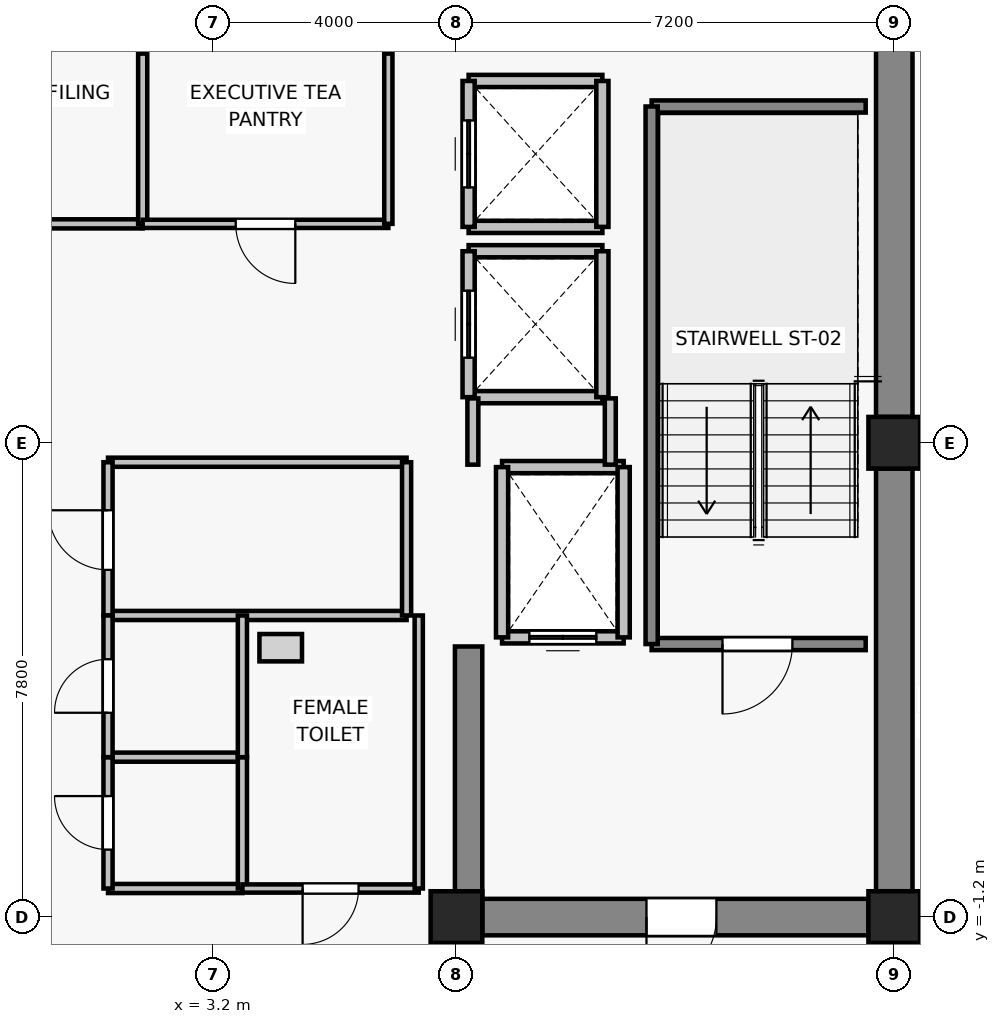
"""IFC4 building model, lengths in metres.
Left out: names, types, materials, properties, quantities, classifications, styles, units other than length and angle.
Written with IfcOpenShell. Run it as: python <this file> out.ifc"""

import sys

from ifc_helpers import new_model, si_unit, direction, frame, frame_2d, origin, origin_2d, place, context, subcontext, project, spatial, rectangle, extrude, source, transform, mapped, element, fill, save


model = new_model("IFC4")
c1 = context("Model", 3, precision=1e-05, world=origin(), true_north=direction((0.0, 1.0)))
c2 = subcontext(c1, "Body", "Model", "MODEL_VIEW")
j1 = project(units=[si_unit("LENGTHUNIT", "METRE"), si_unit("PLANEANGLEUNIT", "RADIAN")], contexts=[c1])
p1 = place(None, origin())
s1 = spatial("IfcSite", under=j1, at=p1, CompositionType="ELEMENT")
p2 = place(p1, origin())
s2 = spatial("IfcBuilding", under=s1, at=p2, CompositionType="ELEMENT")
p3 = place(p2, frame((0.0, 0.0, 245.2)))
s3 = spatial("IfcBuildingStorey", under=s2, at=p3, CompositionType="ELEMENT", Elevation=245.2)
for number, where, z_axis, x_axis in (
    (1, (7.2, -1.2, 0.0), (0.0, 0.0, 1.0), (1.0, 0.0, 0.0)),
    (2, (14.4, -1.2, 0.0), (0.0, 0.0, 1.0), (1.0, 0.0, 0.0)),
    (3, (14.4, 6.6, 0.0), (0.0, 0.0, 1.0), (1.0, 0.0, 0.0)),
):
    element("IfcColumn", number, at=place(p3, frame(where, z_axis=z_axis, x_axis=x_axis)), inside=s3, PredefinedType="COLUMN", context=c2, shape_type="SweptSolid", body=[
        extrude(rectangle(XDim=0.85, YDim=0.85, at=origin_2d()), origin(), (0.0, 0.0, 1.0), 3.3),
    ])
p4 = place(p3, frame((14.4, -0.775, 0.0), z_axis=(0.0, 0.0, 1.0), x_axis=(0.0, 1.0, 0.0)))
e4 = element("IfcWall", 4, at=p4, inside=s3, PredefinedType="SHEAR", context=c2, shape_type="SweptSolid", body=[
    extrude(rectangle(XDim=6.95, YDim=0.6, at=frame_2d((3.475, 0.0))), origin(), (0.0, 0.0, 1.0), 3.075),
])
p5 = place(p3, frame((14.4, 7.025, 0.0), z_axis=(0.0, 0.0, 1.0), x_axis=(0.0, 1.0, 0.0)))
e5 = element("IfcWall", 5, at=p5, inside=s3, PredefinedType="SHEAR", context=c2, shape_type="SweptSolid", body=[
    extrude(rectangle(XDim=6.05, YDim=0.6, at=frame_2d((3.025, 0.0))), origin(), (0.0, 0.0, 1.0), 3.075),
])
p6 = place(p3, frame((13.975, -1.2, 0.0), z_axis=(0.0, 0.0, 1.0), x_axis=(-1.0, 0.0, 0.0)))
e6 = element("IfcWall", 6, at=p6, inside=s3, PredefinedType="SHEAR", context=c2, shape_type="SweptSolid", body=[
    extrude(rectangle(XDim=6.35, YDim=0.6, at=frame_2d((3.175, 0.0))), origin(), (0.0, 0.0, 1.0), 3.075),
])
p7 = place(p6, frame((2.5, 0.0, 0.0)))
e7 = element("IfcOpeningElement", 7, at=p7, cuts=e6, PredefinedType="OPENING", context=c2, shape_type="SweptSolid", body=[
    extrude(rectangle(XDim=1.15, YDim=2.15, at=frame_2d((0.575, 1.075))), frame((0.0, 0.31, 0.0), z_axis=(0.0, -1.0, 0.0), x_axis=(1.0, 0.0, 0.0)), (0.0, 0.0, 1.0), 0.62),
])
p8 = place(p3, frame((7.4, -0.9, 0.0), z_axis=(0.0, 0.0, 1.0), x_axis=(0.0, 1.0, 0.0)))
e8 = element("IfcWall", 8, at=p8, inside=s3, PredefinedType="SHEAR", context=c2, shape_type="SweptSolid", body=[
    extrude(rectangle(XDim=4.15, YDim=0.45, at=frame_2d((2.075, 0.0))), origin(), (0.0, 0.0, 1.0), 3.075),
])
p9 = place(p3, frame((9.95, 3.4, 0.0), z_axis=(0.0, 0.0, 1.0), x_axis=(-1.0, 0.0, 0.0)))
e9 = element("IfcWall", 9, at=p9, inside=s3, PredefinedType="SOLIDWALL", context=c2, shape_type="SweptSolid", body=[
    extrude(rectangle(XDim=2.0, YDim=0.2, at=frame_2d((1.0, 0.0))), origin(), (0.0, 0.0, 1.0), 3.075),
])
p10 = place(p9, frame((0.45, 0.0, 0.0)))
e10 = element("IfcOpeningElement", 10, at=p10, cuts=e9, PredefinedType="OPENING", context=c2, shape_type="SweptSolid", body=[
    extrude(rectangle(XDim=1.1, YDim=2.2, at=frame_2d((0.55, 1.1))), frame((0.0, 0.11, 0.0), z_axis=(0.0, -1.0, 0.0), x_axis=(1.0, 0.0, 0.0)), (0.0, 0.0, 1.0), 0.22),
])
p11 = place(p3, frame((7.95, 6.2, 0.0), z_axis=(0.0, 0.0, 1.0), x_axis=(1.0, 0.0, 0.0)))
e11 = element("IfcWall", 11, at=p11, inside=s3, PredefinedType="SOLIDWALL", context=c2, shape_type="SweptSolid", body=[
    extrude(rectangle(XDim=2.0, YDim=0.2, at=frame_2d((1.0, 0.0))), origin(), (0.0, 0.0, 1.0), 3.075),
])
for number, where, z_axis, x_axis in (
    (12, (7.95, 3.4, 0.0), (0.0, 0.0, 1.0), (0.0, 1.0, 0.0)),
    (13, (9.95, 6.2, 0.0), (0.0, 0.0, 1.0), (0.0, -1.0, 0.0)),
):
    element("IfcWall", number, at=place(p3, frame(where, z_axis=z_axis, x_axis=x_axis)), inside=s3, PredefinedType="SOLIDWALL", context=c2, shape_type="SweptSolid", body=[
        extrude(rectangle(XDim=2.8, YDim=0.2, at=frame_2d((1.4, 0.0))), origin(), (0.0, 0.0, 1.0), 3.075),
    ])
for number, where, z_axis, x_axis in (
    (14, (9.6, 7.35, 0.0), (0.0, 0.0, 1.0), (-1.0, 0.0, 0.0)),
    (15, (7.4, 9.75, 0.0), (0.0, 0.0, 1.0), (1.0, 0.0, 0.0)),
):
    element("IfcWall", number, at=place(p3, frame(where, z_axis=z_axis, x_axis=x_axis)), inside=s3, PredefinedType="SOLIDWALL", context=c2, shape_type="SweptSolid", body=[
        extrude(rectangle(XDim=2.2, YDim=0.2, at=frame_2d((1.1, 0.0))), origin(), (0.0, 0.0, 1.0), 2.615),
    ])
p12 = place(p3, frame((7.4, 7.35, 0.0), z_axis=(0.0, 0.0, 1.0), x_axis=(0.0, 1.0, 0.0)))
e16 = element("IfcWall", 16, at=p12, inside=s3, PredefinedType="SOLIDWALL", context=c2, shape_type="SweptSolid", body=[
    extrude(rectangle(XDim=2.4, YDim=0.2, at=frame_2d((1.2, 0.0))), origin(), (0.0, 0.0, 1.0), 2.615),
])
p13 = place(p12, frame((0.65, 0.0, 0.0)))
e17 = element("IfcOpeningElement", 17, at=p13, cuts=e16, PredefinedType="OPENING", context=c2, shape_type="SweptSolid", body=[
    extrude(rectangle(XDim=1.1, YDim=2.2, at=frame_2d((0.55, 1.1))), frame((0.0, 0.11, 0.0), z_axis=(0.0, -1.0, 0.0), x_axis=(1.0, 0.0, 0.0)), (0.0, 0.0, 1.0), 0.22),
])
p14 = place(p3, frame((9.6, 9.75, 0.0), z_axis=(0.0, 0.0, 1.0), x_axis=(0.0, -1.0, 0.0)))
e18 = element("IfcWall", 18, at=p14, inside=s3, PredefinedType="SOLIDWALL", context=c2, shape_type="SweptSolid", body=[
    extrude(rectangle(XDim=2.4, YDim=0.2, at=frame_2d((1.2, 0.0))), origin(), (0.0, 0.0, 1.0), 3.075),
])
for number, where, z_axis, x_axis in (
    (19, (9.6, 10.15, 0.0), (0.0, 0.0, 1.0), (-1.0, 0.0, 0.0)),
    (20, (7.4, 12.55, 0.0), (0.0, 0.0, 1.0), (1.0, 0.0, 0.0)),
):
    element("IfcWall", number, at=place(p3, frame(where, z_axis=z_axis, x_axis=x_axis)), inside=s3, PredefinedType="SOLIDWALL", context=c2, shape_type="SweptSolid", body=[
        extrude(rectangle(XDim=2.2, YDim=0.2, at=frame_2d((1.1, 0.0))), origin(), (0.0, 0.0, 1.0), 2.615),
    ])
p15 = place(p3, frame((7.4, 10.15, 0.0), z_axis=(0.0, 0.0, 1.0), x_axis=(0.0, 1.0, 0.0)))
e21 = element("IfcWall", 21, at=p15, inside=s3, PredefinedType="SOLIDWALL", context=c2, shape_type="SweptSolid", body=[
    extrude(rectangle(XDim=2.4, YDim=0.2, at=frame_2d((1.2, 0.0))), origin(), (0.0, 0.0, 1.0), 2.615),
])
p16 = place(p15, frame((0.65, 0.0, 0.0)))
e22 = element("IfcOpeningElement", 22, at=p16, cuts=e21, PredefinedType="OPENING", context=c2, shape_type="SweptSolid", body=[
    extrude(rectangle(XDim=1.1, YDim=2.2, at=frame_2d((0.55, 1.1))), frame((0.0, 0.11, 0.0), z_axis=(0.0, -1.0, 0.0), x_axis=(1.0, 0.0, 0.0)), (0.0, 0.0, 1.0), 0.22),
])
p17 = place(p3, frame((9.6, 12.55, 0.0), z_axis=(0.0, 0.0, 1.0), x_axis=(0.0, -1.0, 0.0)))
e23 = element("IfcWall", 23, at=p17, inside=s3, PredefinedType="SOLIDWALL", context=c2, shape_type="SweptSolid", body=[
    extrude(rectangle(XDim=2.4, YDim=0.2, at=frame_2d((1.2, 0.0))), origin(), (0.0, 0.0, 1.0), 3.075),
])
p18 = place(p3, frame((13.93, 3.29, 0.0), z_axis=(0.0, 0.0, 1.0), x_axis=(-1.0, 0.0, 0.0)))
e24 = element("IfcWall", 24, at=p18, inside=s3, PredefinedType="SOLIDWALL", context=c2, shape_type="SweptSolid", body=[
    extrude(rectangle(XDim=3.52, YDim=0.2, at=frame_2d((1.76, 0.0))), origin(), (0.0, 0.0, 1.0), 3.075),
])
p19 = place(p18, frame((1.205, 0.0, 0.0)))
e25 = element("IfcOpeningElement", 25, at=p19, cuts=e24, PredefinedType="OPENING", context=c2, shape_type="SweptSolid", body=[
    extrude(rectangle(XDim=1.15, YDim=2.15, at=frame_2d((0.575, 1.075))), frame((0.0, 0.11, 0.0), z_axis=(0.0, -1.0, 0.0), x_axis=(1.0, 0.0, 0.0)), (0.0, 0.0, 1.0), 0.22),
])
p20 = place(p3, frame((10.41, 12.13, 0.0), z_axis=(0.0, 0.0, 1.0), x_axis=(1.0, 0.0, 0.0)))
e26 = element("IfcWall", 26, at=p20, inside=s3, PredefinedType="SOLIDWALL", context=c2, shape_type="SweptSolid", body=[
    extrude(rectangle(XDim=3.52, YDim=0.2, at=frame_2d((1.76, 0.0))), origin(), (0.0, 0.0, 1.0), 3.075),
])
p21 = place(p3, frame((10.41, 3.29, 0.0), z_axis=(0.0, 0.0, 1.0), x_axis=(0.0, 1.0, 0.0)))
e27 = element("IfcWall", 27, at=p21, inside=s3, PredefinedType="SOLIDWALL", context=c2, shape_type="SweptSolid", body=[
    extrude(rectangle(XDim=8.84, YDim=0.2, at=frame_2d((4.42, 0.0))), origin(), (0.0, 0.0, 1.0), 3.075),
])
p22 = place(p3, frame((7.47, 6.24, 0.0), z_axis=(0.0, 0.0, 1.0), x_axis=(0.0, 1.0, 0.0)))
e28 = element("IfcWall", 28, at=p22, inside=s3, PredefinedType="PARTITIONING", context=c2, shape_type="SweptSolid", body=[
    extrude(rectangle(XDim=1.09, YDim=0.18, at=frame_2d((0.545, 0.0))), origin(), (0.0, 0.0, 1.0), 2.615),
])
p23 = place(p3, frame((9.73, 7.33, 0.0), z_axis=(0.0, 0.0, 1.0), x_axis=(0.0, -1.0, 0.0)))
e29 = element("IfcWall", 29, at=p23, inside=s3, PredefinedType="PARTITIONING", context=c2, shape_type="SweptSolid", body=[
    extrude(rectangle(XDim=1.09, YDim=0.18, at=frame_2d((0.545, 0.0))), origin(), (0.0, 0.0, 1.0), 3.075),
])
p24 = place(p3, frame((2.04, 10.2, 0.0), z_axis=(0.0, 0.0, 1.0), x_axis=(-1.0, 0.0, 0.0)))
e30 = element("IfcWall", 30, at=p24, inside=s3, PredefinedType="PARTITIONING", context=c2, shape_type="SweptSolid", body=[
    extrude(rectangle(XDim=4.16, YDim=0.15, at=frame_2d((2.08, 0.0))), origin(), (0.0, 0.0, 1.0), 3.075),
])
p25 = place(p24, frame((1.55, 0.0, 0.0)))
e31 = element("IfcOpeningElement", 31, at=p25, cuts=e30, PredefinedType="OPENING", context=c2, shape_type="SweptSolid", body=[
    extrude(rectangle(XDim=0.98, YDim=2.15, at=frame_2d((0.49, 1.075))), frame((0.0, 0.085, 0.0), z_axis=(0.0, -1.0, 0.0), x_axis=(1.0, 0.0, 0.0)), (0.0, 0.0, 1.0), 0.17),
])
p26 = place(p3, frame((2.04, 13.0, 0.0), z_axis=(0.0, 0.0, 1.0), x_axis=(0.0, -1.0, 0.0)))
e32 = element("IfcWall", 32, at=p26, inside=s3, PredefinedType="PARTITIONING", context=c2, shape_type="SweptSolid", body=[
    extrude(rectangle(XDim=2.8, YDim=0.15, at=frame_2d((1.4, 0.0))), origin(), (0.0, 0.0, 1.0), 3.075),
])
p27 = place(p3, frame((6.08, 10.2, 0.0), z_axis=(0.0, 0.0, 1.0), x_axis=(-1.0, 0.0, 0.0)))
e33 = element("IfcWall", 33, at=p27, inside=s3, PredefinedType="PARTITIONING", context=c2, shape_type="SweptSolid", body=[
    extrude(rectangle(XDim=4.04, YDim=0.135, at=frame_2d((2.02, 0.0))), origin(), (0.0, 0.0, 1.0), 3.075),
])
p28 = place(p27, frame((1.53, 0.0, 0.0)))
e34 = element("IfcOpeningElement", 34, at=p28, cuts=e33, PredefinedType="OPENING", context=c2, shape_type="SweptSolid", body=[
    extrude(rectangle(XDim=0.98, YDim=2.15, at=frame_2d((0.49, 1.075))), frame((0.0, 0.077, 0.0), z_axis=(0.0, -1.0, 0.0), x_axis=(1.0, 0.0, 0.0)), (0.0, 0.0, 1.0), 0.155),
])
p29 = place(p3, frame((6.08, 13.0, 0.0), z_axis=(0.0, 0.0, 1.0), x_axis=(0.0, -1.0, 0.0)))
e35 = element("IfcWall", 35, at=p29, inside=s3, PredefinedType="PARTITIONING", context=c2, shape_type="SweptSolid", body=[
    extrude(rectangle(XDim=2.8, YDim=0.135, at=frame_2d((1.4, 0.0))), origin(), (0.0, 0.0, 1.0), 3.075),
])
for number, where, z_axis, x_axis in (
    (36, (6.38, 3.76, 0.0), (0.0, 0.0, 1.0), (-1.0, 0.0, 0.0)),
    (37, (1.47, 6.28, 0.0), (0.0, 0.0, 1.0), (1.0, 0.0, 0.0)),
):
    element("IfcWall", number, at=place(p3, frame(where, z_axis=z_axis, x_axis=x_axis)), inside=s3, PredefinedType="PARTITIONING", context=c2, shape_type="SweptSolid", body=[
        extrude(rectangle(XDim=4.91, YDim=0.15, at=frame_2d((2.455, 0.0))), origin(), (0.0, 0.0, 1.0), 3.075),
    ])
p30 = place(p3, frame((1.47, 3.76, 0.0), z_axis=(0.0, 0.0, 1.0), x_axis=(0.0, 1.0, 0.0)))
e38 = element("IfcWall", 38, at=p30, inside=s3, PredefinedType="PARTITIONING", context=c2, shape_type="SweptSolid", body=[
    extrude(rectangle(XDim=2.52, YDim=0.15, at=frame_2d((1.26, 0.0))), origin(), (0.0, 0.0, 1.0), 3.075),
])
p31 = place(p30, frame((0.75, 0.0, 0.0)))
e39 = element("IfcOpeningElement", 39, at=p31, cuts=e38, PredefinedType="OPENING", context=c2, shape_type="SweptSolid", body=[
    extrude(rectangle(XDim=0.98, YDim=2.15, at=frame_2d((0.49, 1.075))), frame((0.0, 0.085, 0.0), z_axis=(0.0, -1.0, 0.0), x_axis=(1.0, 0.0, 0.0)), (0.0, 0.0, 1.0), 0.17),
])
p32 = place(p3, frame((6.38, 6.28, 0.0), z_axis=(0.0, 0.0, 1.0), x_axis=(0.0, -1.0, 0.0)))
e40 = element("IfcWall", 40, at=p32, inside=s3, PredefinedType="PARTITIONING", context=c2, shape_type="SweptSolid", body=[
    extrude(rectangle(XDim=2.52, YDim=0.15, at=frame_2d((1.26, 0.0))), origin(), (0.0, 0.0, 1.0), 3.075),
])
for number, where, z_axis, x_axis in (
    (41, (3.68, -0.73, 0.0), (0.0, 0.0, 1.0), (-1.0, 0.0, 0.0)),
    (42, (1.47, 1.43, 0.0), (0.0, 0.0, 1.0), (1.0, 0.0, 0.0)),
):
    element("IfcWall", number, at=place(p3, frame(where, z_axis=z_axis, x_axis=x_axis)), inside=s3, PredefinedType="PARTITIONING", context=c2, shape_type="SweptSolid", body=[
        extrude(rectangle(XDim=2.21, YDim=0.15, at=frame_2d((1.105, 0.0))), origin(), (0.0, 0.0, 1.0), 3.075),
    ])
p33 = place(p3, frame((1.47, -0.73, 0.0), z_axis=(0.0, 0.0, 1.0), x_axis=(0.0, 1.0, 0.0)))
e43 = element("IfcWall", 43, at=p33, inside=s3, PredefinedType="PARTITIONING", context=c2, shape_type="SweptSolid", body=[
    extrude(rectangle(XDim=2.16, YDim=0.15, at=frame_2d((1.08, 0.0))), origin(), (0.0, 0.0, 1.0), 3.075),
])
p34 = place(p33, frame((0.64, 0.0, 0.0)))
e44 = element("IfcOpeningElement", 44, at=p34, cuts=e43, PredefinedType="OPENING", context=c2, shape_type="SweptSolid", body=[
    extrude(rectangle(XDim=0.88, YDim=2.1, at=frame_2d((0.44, 1.05))), frame((0.0, 0.085, 0.0), z_axis=(0.0, -1.0, 0.0), x_axis=(1.0, 0.0, 0.0)), (0.0, 0.0, 1.0), 0.17),
])
p35 = place(p3, frame((3.68, 1.43, 0.0), z_axis=(0.0, 0.0, 1.0), x_axis=(0.0, -1.0, 0.0)))
e45 = element("IfcWall", 45, at=p35, inside=s3, PredefinedType="PARTITIONING", context=c2, shape_type="SweptSolid", body=[
    extrude(rectangle(XDim=2.16, YDim=0.15, at=frame_2d((1.08, 0.0))), origin(), (0.0, 0.0, 1.0), 3.075),
])
p36 = place(p3, frame((1.47, 1.43, 0.0), z_axis=(0.0, 0.0, 1.0), x_axis=(0.0, 1.0, 0.0)))
e46 = element("IfcWall", 46, at=p36, inside=s3, PredefinedType="PARTITIONING", context=c2, shape_type="SweptSolid", body=[
    extrude(rectangle(XDim=2.33, YDim=0.15, at=frame_2d((1.165, 0.0))), origin(), (0.0, 0.0, 1.0), 3.075),
])
p37 = place(p36, frame((0.73, 0.0, 0.0)))
e47 = element("IfcOpeningElement", 47, at=p37, cuts=e46, PredefinedType="OPENING", context=c2, shape_type="SweptSolid", body=[
    extrude(rectangle(XDim=0.88, YDim=2.15, at=frame_2d((0.44, 1.075))), frame((0.0, 0.085, 0.0), z_axis=(0.0, -1.0, 0.0), x_axis=(1.0, 0.0, 0.0)), (0.0, 0.0, 1.0), 0.17),
])
p38 = place(p3, frame((3.68, 3.76, 0.0), z_axis=(0.0, 0.0, 1.0), x_axis=(0.0, -1.0, 0.0)))
e48 = element("IfcWall", 48, at=p38, inside=s3, PredefinedType="PARTITIONING", context=c2, shape_type="SweptSolid", body=[
    extrude(rectangle(XDim=2.33, YDim=0.15, at=frame_2d((1.165, 0.0))), origin(), (0.0, 0.0, 1.0), 3.075),
])
p39 = place(p3, frame((6.58, -0.73, 0.0), z_axis=(0.0, 0.0, 1.0), x_axis=(-1.0, 0.0, 0.0)))
e49 = element("IfcWall", 49, at=p39, inside=s3, PredefinedType="PARTITIONING", context=c2, shape_type="SweptSolid", body=[
    extrude(rectangle(XDim=2.9, YDim=0.135, at=frame_2d((1.45, 0.0))), origin(), (0.0, 0.0, 1.0), 3.075),
])
p40 = place(p39, frame((0.99, 0.0, 0.0)))
e50 = element("IfcOpeningElement", 50, at=p40, cuts=e49, PredefinedType="OPENING", context=c2, shape_type="SweptSolid", body=[
    extrude(rectangle(XDim=0.92, YDim=2.1, at=frame_2d((0.46, 1.05))), frame((0.0, 0.077, 0.0), z_axis=(0.0, -1.0, 0.0), x_axis=(1.0, 0.0, 0.0)), (0.0, 0.0, 1.0), 0.155),
])
p41 = place(p3, frame((6.58, 3.76, 0.0), z_axis=(0.0, 0.0, 1.0), x_axis=(0.0, -1.0, 0.0)))
e51 = element("IfcWall", 51, at=p41, inside=s3, PredefinedType="PARTITIONING", context=c2, shape_type="SweptSolid", body=[
    extrude(rectangle(XDim=4.49, YDim=0.135, at=frame_2d((2.245, 0.0))), origin(), (0.0, 0.0, 1.0), 3.075),
])
m1 = source(origin(), c2, "Body", "SweptSolid", [
    extrude(rectangle(XDim=1.1, YDim=2.2, at=frame_2d((0.55, 1.1))), frame((0.0, 0.025, 0.0), z_axis=(0.0, -1.0, 0.0), x_axis=(1.0, 0.0, 0.0)), (0.0, 0.0, 1.0), 0.05),
])
p42 = place(p10, origin())
e52 = element("IfcDoor", 52, at=p42, inside=s3, OperationType="DOUBLE_DOOR_SLIDING", PredefinedType="DOOR", context=c2, shape_type="MappedRepresentation", body=[
    mapped(m1, transform((0.0, 0.0, 0.0), x_axis=(1.0, 0.0, 0.0), y_axis=(0.0, 1.0, 0.0), z_axis=(0.0, 0.0, 1.0), scale=1.0)),
])
fill(e10, e52)
p43 = place(p13, origin())
e53 = element("IfcDoor", 53, at=p43, inside=s3, OperationType="DOUBLE_DOOR_SLIDING", PredefinedType="DOOR", context=c2, shape_type="MappedRepresentation", body=[
    mapped(m1, transform((0.0, 0.0, 0.0), x_axis=(1.0, 0.0, 0.0), y_axis=(0.0, 1.0, 0.0), z_axis=(0.0, 0.0, 1.0), scale=1.0)),
])
fill(e17, e53)
p44 = place(p16, origin())
e54 = element("IfcDoor", 54, at=p44, inside=s3, OperationType="DOUBLE_DOOR_SLIDING", PredefinedType="DOOR", context=c2, shape_type="MappedRepresentation", body=[
    mapped(m1, transform((0.0, 0.0, 0.0), x_axis=(1.0, 0.0, 0.0), y_axis=(0.0, 1.0, 0.0), z_axis=(0.0, 0.0, 1.0), scale=1.0)),
])
fill(e22, e54)
m2 = source(origin(), c2, "Body", "SweptSolid", [
    extrude(rectangle(XDim=1.15, YDim=2.15, at=frame_2d((0.575, 1.075))), frame((0.0, 0.025, 0.0), z_axis=(0.0, -1.0, 0.0), x_axis=(1.0, 0.0, 0.0)), (0.0, 0.0, 1.0), 0.05),
])
p45 = place(p19, origin())
e55 = element("IfcDoor", 55, at=p45, inside=s3, OperationType="SINGLE_SWING_RIGHT", PredefinedType="DOOR", context=c2, shape_type="MappedRepresentation", body=[
    mapped(m2, transform((0.0, 0.0, 0.0), x_axis=(1.0, 0.0, 0.0), y_axis=(0.0, 1.0, 0.0), z_axis=(0.0, 0.0, 1.0), scale=1.0)),
])
fill(e25, e55)
p46 = place(p7, origin())
e56 = element("IfcDoor", 56, at=p46, inside=s3, OperationType="SINGLE_SWING_RIGHT", PredefinedType="DOOR", context=c2, shape_type="MappedRepresentation", body=[
    mapped(m2, transform((0.0, 0.0, 0.0), x_axis=(1.0, 0.0, 0.0), y_axis=(0.0, 1.0, 0.0), z_axis=(0.0, 0.0, 1.0), scale=1.0)),
])
fill(e7, e56)
m3 = source(origin(), c2, "Body", "SweptSolid", [
    extrude(rectangle(XDim=0.98, YDim=2.15, at=frame_2d((0.49, 1.075))), frame((0.0, 0.025, 0.0), z_axis=(0.0, -1.0, 0.0), x_axis=(1.0, 0.0, 0.0)), (0.0, 0.0, 1.0), 0.05),
])
p47 = place(p28, origin())
e57 = element("IfcDoor", 57, at=p47, inside=s3, OperationType="SINGLE_SWING_LEFT", PredefinedType="DOOR", context=c2, shape_type="MappedRepresentation", body=[
    mapped(m3, transform((0.0, 0.0, 0.0), x_axis=(1.0, 0.0, 0.0), y_axis=(0.0, 1.0, 0.0), z_axis=(0.0, 0.0, 1.0), scale=1.0)),
])
fill(e34, e57)
p48 = place(p31, origin())
e58 = element("IfcDoor", 58, at=p48, inside=s3, OperationType="SINGLE_SWING_RIGHT", PredefinedType="DOOR", context=c2, shape_type="MappedRepresentation", body=[
    mapped(m3, transform((0.0, 0.0, 0.0), x_axis=(1.0, 0.0, 0.0), y_axis=(0.0, 1.0, 0.0), z_axis=(0.0, 0.0, 1.0), scale=1.0)),
])
fill(e39, e58)
m4 = source(origin(), c2, "Body", "SweptSolid", [
    extrude(rectangle(XDim=0.88, YDim=2.1, at=frame_2d((0.44, 1.05))), frame((0.0, 0.025, 0.0), z_axis=(0.0, -1.0, 0.0), x_axis=(1.0, 0.0, 0.0)), (0.0, 0.0, 1.0), 0.05),
])
p49 = place(p34, origin())
e59 = element("IfcDoor", 59, at=p49, inside=s3, OperationType="SINGLE_SWING_RIGHT", PredefinedType="DOOR", context=c2, shape_type="MappedRepresentation", body=[
    mapped(m4, transform((0.0, 0.0, 0.0), x_axis=(1.0, 0.0, 0.0), y_axis=(0.0, 1.0, 0.0), z_axis=(0.0, 0.0, 1.0), scale=1.0)),
])
fill(e44, e59)
m5 = source(origin(), c2, "Body", "SweptSolid", [
    extrude(rectangle(XDim=0.88, YDim=2.15, at=frame_2d((0.44, 1.075))), frame((0.0, 0.025, 0.0), z_axis=(0.0, -1.0, 0.0), x_axis=(1.0, 0.0, 0.0)), (0.0, 0.0, 1.0), 0.05),
])
p50 = place(p37, origin())
e60 = element("IfcDoor", 60, at=p50, inside=s3, OperationType="SINGLE_SWING_LEFT", PredefinedType="DOOR", context=c2, shape_type="MappedRepresentation", body=[
    mapped(m5, transform((0.0, 0.0, 0.0), x_axis=(1.0, 0.0, 0.0), y_axis=(0.0, 1.0, 0.0), z_axis=(0.0, 0.0, 1.0), scale=1.0)),
])
fill(e47, e60)
m6 = source(origin(), c2, "Body", "SweptSolid", [
    extrude(rectangle(XDim=0.92, YDim=2.1, at=frame_2d((0.46, 1.05))), frame((0.0, 0.025, 0.0), z_axis=(0.0, -1.0, 0.0), x_axis=(1.0, 0.0, 0.0)), (0.0, 0.0, 1.0), 0.05),
])
p51 = place(p40, origin())
e61 = element("IfcDoor", 61, at=p51, inside=s3, OperationType="SINGLE_SWING_RIGHT", PredefinedType="DOOR", context=c2, shape_type="MappedRepresentation", body=[
    mapped(m6, transform((0.0, 0.0, 0.0), x_axis=(1.0, 0.0, 0.0), y_axis=(0.0, 1.0, 0.0), z_axis=(0.0, 0.0, 1.0), scale=1.0)),
])
fill(e50, e61)
save(model, sys.argv[1])
